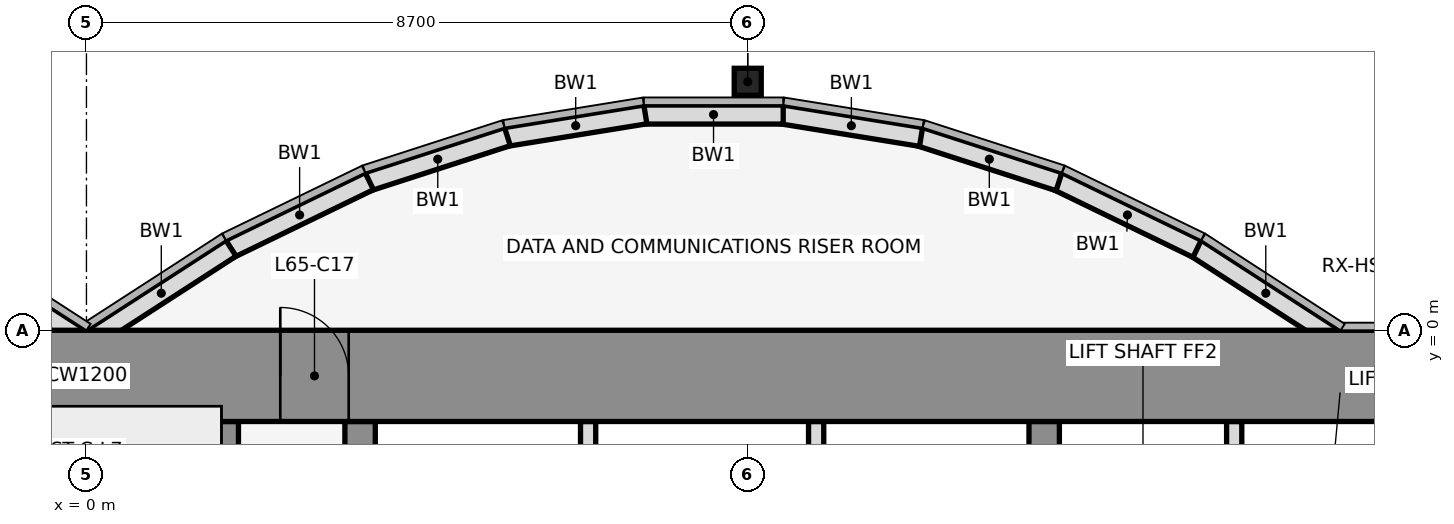
"""IFC4 building model, lengths in metres.
Left out: names, types, materials, properties, quantities, classifications, styles, units other than length and angle.
Written with IfcOpenShell. Run it as: python <this file> out.ifc"""

import sys

from ifc_helpers import new_model, si_unit, direction, frame, frame_2d, origin, origin_2d, place, context, subcontext, project, spatial, rectangle, hollow_rectangle, extrude, element, fill, save


model = new_model("IFC4")
c1 = context("Model", 3, precision=1e-05, world=origin(), true_north=direction((0.0, 1.0)))
c2 = subcontext(c1, "Body", "Model", "MODEL_VIEW")
j1 = project(units=[si_unit("LENGTHUNIT", "METRE"), si_unit("PLANEANGLEUNIT", "RADIAN")], contexts=[c1])
p1 = place(None, origin())
s1 = spatial("IfcSite", under=j1, at=p1, CompositionType="ELEMENT")
p2 = place(p1, origin())
s2 = spatial("IfcBuilding", under=s1, at=p2, CompositionType="ELEMENT")
p3 = place(p2, frame((0.0, 0.0, 287.6)))
s3 = spatial("IfcBuildingStorey", under=s2, at=p3, CompositionType="ELEMENT", Elevation=287.6)
p4 = place(p3, frame((8.7, 3.269, 0.0), z_axis=(0.0, 0.0, 1.0), x_axis=(1.0, 0.0, 0.0)))
e1 = element("IfcColumn", 1, at=p4, inside=s3, PredefinedType="COLUMN", context=c2, shape_type="SweptSolid", body=[
    extrude(hollow_rectangle(XDim=0.356, YDim=0.356, WallThickness=0.012, at=origin_2d()), origin(), (0.0, 0.0, 1.0), 5.4),
])
p5 = place(p3, frame((16.432, -0.105, 0.0), z_axis=(0.0, 0.0, 1.0), x_axis=(-0.83981312244, 0.542875602121, 0.0)))
e2 = element("IfcWall", 2, at=p5, inside=s3, PredefinedType="STANDARD", context=c2, shape_type="SweptSolid", body=[
    extrude(rectangle(XDim=2.183, YDim=0.25, at=frame_2d((1.091, 0.0))), origin(), (0.0, 0.0, 1.0), 5.25),
])
p6 = place(p3, frame((14.612, 1.073, 0.0), z_axis=(0.0, 0.0, 1.0), x_axis=(-0.89982408427, 0.436252928206, 0.0)))
e3 = element("IfcWall", 3, at=p6, inside=s3, PredefinedType="STANDARD", context=c2, shape_type="SweptSolid", body=[
    extrude(rectangle(XDim=2.038, YDim=0.25, at=frame_2d((1.019, 0.0))), origin(), (0.0, 0.0, 1.0), 5.25),
])
p7 = place(p3, frame((12.795, 1.955, 0.0), z_axis=(0.0, 0.0, 1.0), x_axis=(-0.951495806175, 0.307661714928, 0.0)))
e4 = element("IfcWall", 4, at=p7, inside=s3, PredefinedType="STANDARD", context=c2, shape_type="SweptSolid", body=[
    extrude(rectangle(XDim=1.927, YDim=0.25, at=frame_2d((0.963, 0.0))), origin(), (0.0, 0.0, 1.0), 5.25),
])
p8 = place(p3, frame((10.98, 2.543, 0.0), z_axis=(0.0, 0.0, 1.0), x_axis=(-0.987181718931, 0.159600293885, 0.0)))
e5 = element("IfcWall", 5, at=p8, inside=s3, PredefinedType="STANDARD", context=c2, shape_type="SweptSolid", body=[
    extrude(rectangle(XDim=1.857, YDim=0.25, at=frame_2d((0.929, 0.0))), origin(), (0.0, 0.0, 1.0), 5.25),
])
p9 = place(p3, frame((9.167, 2.838, 0.0), z_axis=(0.0, 0.0, 1.0), x_axis=(-1.0, 0.0, 0.0)))
e6 = element("IfcWall", 6, at=p9, inside=s3, PredefinedType="STANDARD", context=c2, shape_type="SweptSolid", body=[
    extrude(rectangle(XDim=1.833, YDim=0.25, at=frame_2d((0.917, 0.0))), origin(), (0.0, 0.0, 1.0), 5.25),
])
p10 = place(p3, frame((7.353, 2.84, 0.0), z_axis=(0.0, 0.0, 1.0), x_axis=(-0.987181718931, -0.159600293885, 0.0)))
e7 = element("IfcWall", 7, at=p10, inside=s3, PredefinedType="STANDARD", context=c2, shape_type="SweptSolid", body=[
    extrude(rectangle(XDim=1.857, YDim=0.25, at=frame_2d((0.929, 0.0))), origin(), (0.0, 0.0, 1.0), 5.25),
])
p11 = place(p3, frame((5.538, 2.548, 0.0), z_axis=(0.0, 0.0, 1.0), x_axis=(-0.951495806175, -0.307661714928, 0.0)))
e8 = element("IfcWall", 8, at=p11, inside=s3, PredefinedType="STANDARD", context=c2, shape_type="SweptSolid", body=[
    extrude(rectangle(XDim=1.927, YDim=0.25, at=frame_2d((0.963, 0.0))), origin(), (0.0, 0.0, 1.0), 5.25),
])
p12 = place(p3, frame((3.721, 1.962, 0.0), z_axis=(0.0, 0.0, 1.0), x_axis=(-0.89982408427, -0.436252928206, 0.0)))
e9 = element("IfcWall", 9, at=p12, inside=s3, PredefinedType="STANDARD", context=c2, shape_type="SweptSolid", body=[
    extrude(rectangle(XDim=2.038, YDim=0.25, at=frame_2d((1.019, 0.0))), origin(), (0.0, 0.0, 1.0), 5.25),
])
for number, where, z_axis, x_axis in (
    (10, (1.901, 1.08, 0.0), (0.0, 0.0, 1.0), (-0.84, -0.543, 0.0)),
    (11, (-0.068, -0.105, 0.0), (0.0, 0.0, 1.0), (-0.84, 0.543, 0.0)),
):
    element("IfcWall", number, at=place(p3, frame(where, z_axis=z_axis, x_axis=x_axis)), inside=s3, PredefinedType="STANDARD", context=c2, shape_type="SweptSolid", body=[
        extrude(rectangle(XDim=2.183, YDim=0.25, at=frame_2d((1.091, 0.0))), origin(), (0.0, 0.0, 1.0), 5.25),
    ])
p13 = place(p3, frame((1.8, -11.8, 0.0), z_axis=(0.0, 0.0, 1.0), x_axis=(0.0, 1.0, 0.0)))
e12 = element("IfcWall", 12, at=p13, inside=s3, PredefinedType="SHEAR", context=c2, shape_type="SweptSolid", body=[
    extrude(rectangle(XDim=10.6, YDim=0.4, at=frame_2d((5.3, 0.0))), origin(), (0.0, 0.0, 1.0), 5.4),
])
p14 = place(p3, frame((3.6, -11.8, 0.0), z_axis=(0.0, 0.0, 1.0), x_axis=(0.0, 1.0, 0.0)))
e13 = element("IfcWall", 13, at=p14, inside=s3, PredefinedType="SHEAR", context=c2, shape_type="SweptSolid", body=[
    extrude(rectangle(XDim=10.6, YDim=0.4, at=frame_2d((5.3, 0.0))), origin(), (0.0, 0.0, 1.0), 5.4),
])
p15 = place(p14, frame((1.35, 0.0, 0.0)))
e14 = element("IfcOpeningElement", 14, at=p15, cuts=e13, PredefinedType="OPENING", context=c2, shape_type="SweptSolid", body=[
    extrude(rectangle(XDim=0.9, YDim=2.1, at=frame_2d((0.45, 1.05))), frame((0.0, 0.212, 0.0), z_axis=(0.0, -1.0, 0.0), x_axis=(1.0, 0.0, 0.0)), (0.0, 0.0, 1.0), 0.424),
])
for number, where, z_axis, x_axis in (
    (15, (6.6, -4.6, 0.0), (0.0, 0.0, 1.0), (0.0, 1.0, 0.0)),
    (16, (9.6, -4.6, 0.0), (0.0, 0.0, 1.0), (0.0, 1.0, 0.0)),
):
    element("IfcWall", number, at=place(p3, frame(where, z_axis=z_axis, x_axis=x_axis)), inside=s3, PredefinedType="PARTITIONING", context=c2, shape_type="SweptSolid", body=[
        extrude(rectangle(XDim=3.4, YDim=0.2, at=frame_2d((1.7, 0.0))), origin(), (0.0, 0.0, 1.0), 4.318),
    ])
p16 = place(p3, frame((12.6, -11.8, 0.0), z_axis=(0.0, 0.0, 1.0), x_axis=(0.0, 1.0, 0.0)))
e17 = element("IfcWall", 17, at=p16, inside=s3, PredefinedType="SHEAR", context=c2, shape_type="SweptSolid", body=[
    extrude(rectangle(XDim=10.6, YDim=0.4, at=frame_2d((5.3, 0.0))), origin(), (0.0, 0.0, 1.0), 5.4),
])
p17 = place(p16, frame((4.75, 0.0, 0.0)))
e18 = element("IfcOpeningElement", 18, at=p17, cuts=e17, PredefinedType="OPENING", context=c2, shape_type="SweptSolid", body=[
    extrude(rectangle(XDim=1.1, YDim=2.1, at=frame_2d((0.55, 1.05))), frame((0.0, 0.212, 0.0), z_axis=(0.0, -1.0, 0.0), x_axis=(1.0, 0.0, 0.0)), (0.0, 0.0, 1.0), 0.424),
])
p18 = place(p3, frame((15.1, -4.6, 0.0), z_axis=(0.0, 0.0, 1.0), x_axis=(0.0, 1.0, 0.0)))
e19 = element("IfcWall", 19, at=p18, inside=s3, PredefinedType="PARTITIONING", context=c2, shape_type="SweptSolid", body=[
    extrude(rectangle(XDim=3.4, YDim=0.2, at=frame_2d((1.7, 0.0))), origin(), (0.0, 0.0, 1.0), 4.318),
])
p19 = place(p3, frame((-22.0, -0.6, 0.0), z_axis=(0.0, 0.0, 1.0), x_axis=(1.0, 0.0, 0.0)))
e20 = element("IfcWall", 20, at=p19, inside=s3, PredefinedType="SHEAR", context=c2, shape_type="SweptSolid", body=[
    extrude(rectangle(XDim=44.0, YDim=1.2, at=frame_2d((22.0, 0.0))), origin(), (0.0, 0.0, 1.0), 5.4),
])
p20 = place(p19, frame((18.55, 0.0, 0.0)))
e21 = element("IfcOpeningElement", 21, at=p20, cuts=e20, PredefinedType="OPENING", context=c2, shape_type="SweptSolid", body=[
    extrude(rectangle(XDim=0.9, YDim=2.1, at=frame_2d((0.45, 1.05))), frame((0.0, 0.612, 0.0), z_axis=(0.0, -1.0, 0.0), x_axis=(1.0, 0.0, 0.0)), (0.0, 0.0, 1.0), 1.224),
])
p21 = place(p19, frame((24.55, 0.0, 0.0)))
e22 = element("IfcOpeningElement", 22, at=p21, cuts=e20, PredefinedType="OPENING", context=c2, shape_type="SweptSolid", body=[
    extrude(rectangle(XDim=0.9, YDim=2.1, at=frame_2d((0.45, 1.05))), frame((0.0, 0.612, 0.0), z_axis=(0.0, -1.0, 0.0), x_axis=(1.0, 0.0, 0.0)), (0.0, 0.0, 1.0), 1.224),
])
p22 = place(p21, origin())
e23 = element("IfcDoor", 23, at=p22, inside=s3, OperationType="SINGLE_SWING_LEFT", PredefinedType="DOOR", context=c2, shape_type="SweptSolid", body=[
    extrude(rectangle(XDim=0.9, YDim=2.1, at=frame_2d((0.45, 1.05))), frame((0.0, 0.025, 0.0), z_axis=(0.0, -1.0, 0.0), x_axis=(1.0, 0.0, 0.0)), (0.0, 0.0, 1.0), 0.05),
])
fill(e22, e23)
save(model, sys.argv[1])
